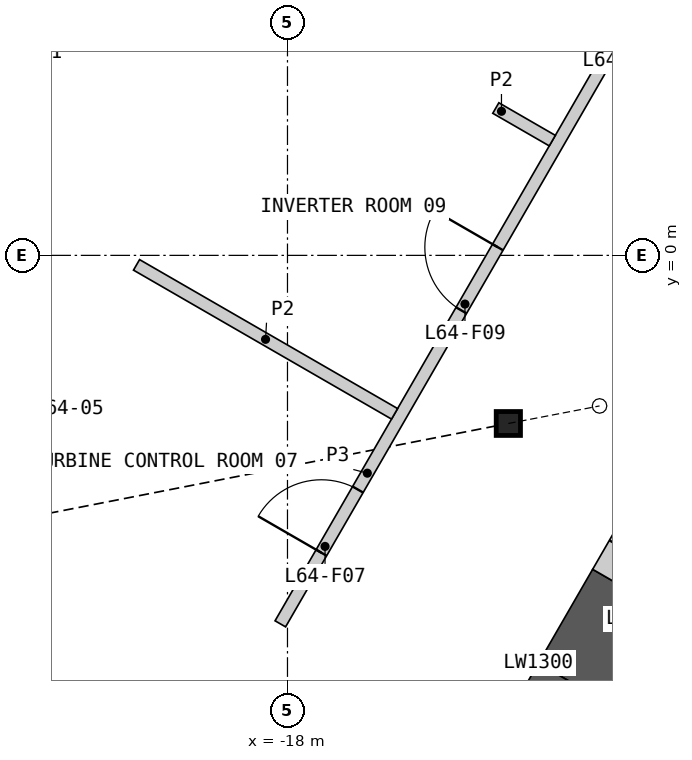
"""IFC4 building model, lengths in metres.
Left out: names, types, materials, properties, quantities, classifications, styles, units other than length and angle.
Written with IfcOpenShell. Run it as: python <this file> out.ifc"""

import sys

from ifc_helpers import new_model, si_unit, direction, frame, frame_2d, origin, origin_2d, place, context, subcontext, project, spatial, polyline, rectangle, i_section, outline, extrude, element, fill, save


model = new_model("IFC4")
c1 = context("Model", 3, precision=1e-05, world=origin(), true_north=direction((0.0, 1.0)))
c2 = subcontext(c1, "Body", "Model", "MODEL_VIEW")
j1 = project(units=[si_unit("LENGTHUNIT", "METRE"), si_unit("PLANEANGLEUNIT", "RADIAN")], contexts=[c1])
p1 = place(None, origin())
s1 = spatial("IfcSite", under=j1, at=p1, CompositionType="ELEMENT")
p2 = place(p1, origin())
s2 = spatial("IfcBuilding", under=s1, at=p2, CompositionType="ELEMENT")
p3 = place(p2, frame((0.0, 0.0, 287.8)))
s3 = spatial("IfcBuildingStorey", under=s2, at=p3, CompositionType="ELEMENT", Elevation=287.8)
p4 = place(p3, frame((-14.368, -2.765, 0.0), z_axis=(0.106510718165, 0.020508167251, 0.99410003621), x_axis=(-0.189072648064, 0.981963102033, 0.0)))
e1 = element("IfcColumn", 1, at=p4, inside=s3, PredefinedType="COLUMN", context=c2, shape_type="SweptSolid", body=[
    extrude(i_section(OverallWidth=0.399, OverallDepth=0.393, WebThickness=0.023, FlangeThickness=0.037, at=origin_2d()), frame((0.0, 0.0, 0.021)), (0.0, 0.0, 1.0), 14.04),
])
p5 = place(p3, frame((-12.418, -5.488, 0.0), z_axis=(0.0, 0.0, 1.0), x_axis=(-0.499931460552, -0.866064971437, 0.0)))
e2 = element("IfcWall", 2, at=p5, inside=s3, PredefinedType="SHEAR", context=c2, shape_type="SweptSolid", body=[
    extrude(rectangle(XDim=1.786, YDim=1.3, at=frame_2d((0.893, 0.0))), origin(), (0.0, 0.0, 1.0), 13.7),
])
p6 = place(p3, origin())
e3 = element("IfcWall", 3, at=p6, inside=s3, PredefinedType="SHEAR", context=c2, shape_type="SweptSolid", body=[
    extrude(outline(polyline([(-13.874, -6.71), (-12.748, -7.36), (-12.748, -8.66), (-15.0, -8.66), (-13.874, -6.71)])), origin(), (0.0, 0.0, 1.0), 13.7),
])
p7 = place(p3, frame((-11.318, -3.583, 0.0), z_axis=(0.0, 0.0, 1.0), x_axis=(-0.50002983664, -0.866008176907, 0.0)))
e4 = element("IfcWall", 4, at=p7, inside=s3, PredefinedType="SHEAR", context=c2, shape_type="SweptSolid", body=[
    extrude(rectangle(XDim=2.2, YDim=1.3, at=frame_2d((1.1, 0.0))), origin(), (0.0, 0.0, 1.0), 13.7),
])
p8 = place(p7, frame((0.65, 0.0, 0.0)))
e5 = element("IfcOpeningElement", 5, at=p8, cuts=e4, PredefinedType="OPENING", context=c2, shape_type="SweptSolid", body=[
    extrude(rectangle(XDim=1.0, YDim=2.1, at=frame_2d((0.5, 1.05))), frame((0.0, 0.66, 0.0), z_axis=(0.0, -1.0, 0.0), x_axis=(1.0, 0.0, 0.0)), (0.0, 0.0, 1.0), 1.32),
])
p9 = place(p3, frame((-18.118, -6.06, 0.0), z_axis=(0.0, 0.0, 1.0), x_axis=(0.49999867524, 0.866026168633, 0.0)))
e6 = element("IfcWall", 6, at=p9, inside=s3, PredefinedType="PARTITIONING", context=c2, shape_type="SweptSolid", body=[
    extrude(rectangle(XDim=28.614, YDim=0.2, at=frame_2d((14.307, 0.0))), origin(), (0.0, 0.0, 1.0), 13.7),
])
p10 = place(p9, frame((1.351, 0.0, 0.0)))
e7 = element("IfcOpeningElement", 7, at=p10, cuts=e6, PredefinedType="OPENING", context=c2, shape_type="SweptSolid", body=[
    extrude(rectangle(XDim=1.2, YDim=2.1, at=frame_2d((0.6, 1.05))), frame((0.0, 0.11, 0.0), z_axis=(0.0, -1.0, 0.0), x_axis=(1.0, 0.0, 0.0)), (0.0, 0.0, 1.0), 0.22),
])
p11 = place(p9, frame((5.953, 0.0, 0.0)))
e8 = element("IfcOpeningElement", 8, at=p11, cuts=e6, PredefinedType="OPENING", context=c2, shape_type="SweptSolid", body=[
    extrude(rectangle(XDim=1.2, YDim=2.1, at=frame_2d((0.6, 1.05))), frame((0.0, 0.11, 0.0), z_axis=(0.0, -1.0, 0.0), x_axis=(1.0, 0.0, 0.0)), (0.0, 0.0, 1.0), 0.22),
])
p12 = place(p9, frame((11.156, 0.0, 0.0)))
e9 = element("IfcOpeningElement", 9, at=p12, cuts=e6, PredefinedType="OPENING", context=c2, shape_type="SweptSolid", body=[
    extrude(rectangle(XDim=1.2, YDim=2.1, at=frame_2d((0.6, 1.05))), frame((0.0, 0.11, 0.0), z_axis=(0.0, -1.0, 0.0), x_axis=(1.0, 0.0, 0.0)), (0.0, 0.0, 1.0), 0.22),
])
p13 = place(p9, frame((16.259, 0.0, 0.0)))
e10 = element("IfcOpeningElement", 10, at=p13, cuts=e6, PredefinedType="OPENING", context=c2, shape_type="SweptSolid", body=[
    extrude(rectangle(XDim=1.2, YDim=2.1, at=frame_2d((0.6, 1.05))), frame((0.0, 0.11, 0.0), z_axis=(0.0, -1.0, 0.0), x_axis=(1.0, 0.0, 0.0)), (0.0, 0.0, 1.0), 0.22),
])
p14 = place(p9, frame((21.461, 0.0, 0.0)))
e11 = element("IfcOpeningElement", 11, at=p14, cuts=e6, PredefinedType="OPENING", context=c2, shape_type="SweptSolid", body=[
    extrude(rectangle(XDim=1.2, YDim=2.1, at=frame_2d((0.6, 1.05))), frame((0.0, 0.11, 0.0), z_axis=(0.0, -1.0, 0.0), x_axis=(1.0, 0.0, 0.0)), (0.0, 0.0, 1.0), 0.22),
])
p15 = place(p9, frame((26.064, 0.0, 0.0)))
e12 = element("IfcOpeningElement", 12, at=p15, cuts=e6, PredefinedType="OPENING", context=c2, shape_type="SweptSolid", body=[
    extrude(rectangle(XDim=1.2, YDim=2.1, at=frame_2d((0.6, 1.05))), frame((0.0, 0.11, 0.0), z_axis=(0.0, -1.0, 0.0), x_axis=(1.0, 0.0, 0.0)), (0.0, 0.0, 1.0), 0.22),
])
p16 = place(p3, frame((-20.482, -0.156, 0.0), z_axis=(0.0, 0.0, 1.0), x_axis=(0.866023786258, -0.500002801628, 0.0)))
e13 = element("IfcWall", 13, at=p16, inside=s3, PredefinedType="PARTITIONING", context=c2, shape_type="SweptSolid", body=[
    extrude(rectangle(XDim=4.9, YDim=0.2, at=frame_2d((2.45, 0.0))), origin(), (0.0, 0.0, 1.0), 13.7),
])
p17 = place(p3, frame((-14.574, 2.423, 0.0), z_axis=(0.0, 0.0, 1.0), x_axis=(0.866007444426, -0.500031105231, 0.0)))
e14 = element("IfcWall", 14, at=p17, inside=s3, PredefinedType="PARTITIONING", context=c2, shape_type="SweptSolid", body=[
    extrude(rectangle(XDim=1.073, YDim=0.2, at=frame_2d((0.536, 0.0))), origin(), (0.0, 0.0, 1.0), 13.7),
])
p18 = place(p10, origin())
e15 = element("IfcDoor", 15, at=p18, inside=s3, OperationType="SINGLE_SWING_LEFT", PredefinedType="DOOR", context=c2, shape_type="SweptSolid", body=[
    extrude(rectangle(XDim=1.2, YDim=2.1, at=frame_2d((0.6, 1.05))), frame((0.0, 0.025, 0.0), z_axis=(0.0, -1.0, 0.0), x_axis=(1.0, 0.0, 0.0)), (0.0, 0.0, 1.0), 0.05),
])
fill(e7, e15)
p19 = place(p11, origin())
e16 = element("IfcDoor", 16, at=p19, inside=s3, OperationType="SINGLE_SWING_RIGHT", PredefinedType="DOOR", context=c2, shape_type="SweptSolid", body=[
    extrude(rectangle(XDim=1.2, YDim=2.1, at=frame_2d((0.6, 1.05))), frame((0.0, 0.025, 0.0), z_axis=(0.0, -1.0, 0.0), x_axis=(1.0, 0.0, 0.0)), (0.0, 0.0, 1.0), 0.05),
])
fill(e8, e16)
save(model, sys.argv[1])
